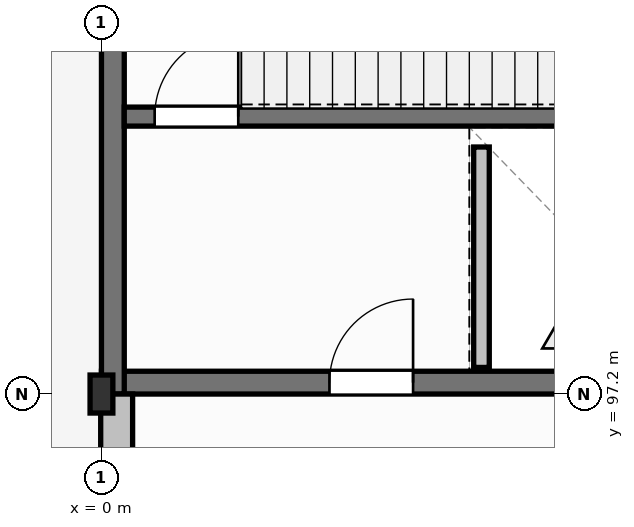
"""IFC4 building model, lengths in metres.
Left out: names, types, materials, properties, quantities, classifications, styles, units other than length and angle.
Written with IfcOpenShell. Run it as: python <this file> out.ifc"""

import sys

from ifc_helpers import new_model, si_unit, direction, frame, frame_2d, origin, origin_2d, place, context, subcontext, project, spatial, rectangle, i_section, extrude, element, fill, save


model = new_model("IFC4")
c1 = context("Model", 3, precision=1e-05, world=origin(), true_north=direction((0.0, 1.0)))
c2 = subcontext(c1, "Body", "Model", "MODEL_VIEW")
j1 = project(units=[si_unit("LENGTHUNIT", "METRE"), si_unit("PLANEANGLEUNIT", "RADIAN")], contexts=[c1])
p1 = place(None, origin())
s1 = spatial("IfcSite", under=j1, at=p1, CompositionType="ELEMENT")
p2 = place(p1, origin())
s2 = spatial("IfcBuilding", under=s1, at=p2, CompositionType="ELEMENT")
p3 = place(p2, origin())
s3 = spatial("IfcBuildingStorey", under=s2, at=p3, CompositionType="ELEMENT", Elevation=0.0)
p4 = place(p3, frame((0.0, 97.35, 0.0), z_axis=(0.0, 0.0, 1.0), x_axis=(1.0, 0.0, 0.0)))
e1 = element("IfcWall", 1, at=p4, inside=s3, PredefinedType="SHEAR", context=c2, shape_type="SweptSolid", body=[
    extrude(rectangle(XDim=8.4, YDim=0.3, at=frame_2d((4.2, 0.0))), origin(), (0.0, 0.0, 1.0), 4.5),
])
p5 = place(p4, frame((3.0, 0.0, 0.0)))
e2 = element("IfcOpeningElement", 2, at=p5, cuts=e1, PredefinedType="OPENING", context=c2, shape_type="SweptSolid", body=[
    extrude(rectangle(XDim=1.1, YDim=2.15, at=frame_2d((0.55, 1.075))), frame((0.0, 0.16, 0.0), z_axis=(0.0, -1.0, 0.0), x_axis=(1.0, 0.0, 0.0)), (0.0, 0.0, 1.0), 0.32),
])
p6 = place(p3, frame((0.15, 97.2, 0.0), z_axis=(0.0, 0.0, 1.0), x_axis=(0.0, 1.0, 0.0)))
e3 = element("IfcWall", 3, at=p6, inside=s3, PredefinedType="SHEAR", context=c2, shape_type="SweptSolid", body=[
    extrude(rectangle(XDim=7.2, YDim=0.3, at=frame_2d((3.6, 0.0))), origin(), (0.0, 0.0, 1.0), 4.5),
])
p7 = place(p6, frame((4.75, 0.0, 0.0)))
e4 = element("IfcOpeningElement", 4, at=p7, cuts=e3, PredefinedType="OPENING", context=c2, shape_type="SweptSolid", body=[
    extrude(rectangle(XDim=1.3, YDim=2.25, at=frame_2d((0.65, 1.125))), frame((0.0, 0.16, 0.0), z_axis=(0.0, -1.0, 0.0), x_axis=(1.0, 0.0, 0.0)), (0.0, 0.0, 1.0), 0.32),
])
p8 = place(p3, frame((0.3, 100.85, 0.0), z_axis=(0.0, 0.0, 1.0), x_axis=(1.0, 0.0, 0.0)))
e5 = element("IfcWall", 5, at=p8, inside=s3, PredefinedType="SHEAR", context=c2, shape_type="SweptSolid", body=[
    extrude(rectangle(XDim=7.8, YDim=0.25, at=frame_2d((3.9, 0.0))), origin(), (0.0, 0.0, 1.0), 4.5),
])
p9 = place(p8, frame((0.4, 0.0, 0.0)))
e6 = element("IfcOpeningElement", 6, at=p9, cuts=e5, PredefinedType="OPENING", context=c2, shape_type="SweptSolid", body=[
    extrude(rectangle(XDim=1.1, YDim=2.15, at=frame_2d((0.55, 1.075))), frame((0.0, 0.135, 0.0), z_axis=(0.0, -1.0, 0.0), x_axis=(1.0, 0.0, 0.0)), (0.0, 0.0, 1.0), 0.27),
])
p10 = place(p3, frame((0.0, 97.2, 0.0), z_axis=(0.0, 0.0, 1.0), x_axis=(1.0, 0.0, 0.0)))
e7 = element("IfcColumn", 7, at=p10, inside=s3, PredefinedType="COLUMN", context=c2, shape_type="SweptSolid", body=[
    extrude(i_section(OverallWidth=0.3, OverallDepth=0.5, WebThickness=0.014, FlangeThickness=0.028, FilletRadius=0.027, at=origin_2d()), origin(), (0.0, 0.0, 1.0), 4.5),
])
p11 = place(p3, frame((0.2, 90.0, 0.0), z_axis=(0.0, 0.0, 1.0), x_axis=(0.0, 1.0, 0.0)))
e8 = element("IfcWall", 8, at=p11, inside=s3, PredefinedType="SOLIDWALL", context=c2, shape_type="SweptSolid", body=[
    extrude(rectangle(XDim=7.2, YDim=0.42, at=frame_2d((3.6, 0.0))), origin(), (0.0, 0.0, 1.0), 3.898),
])
p12 = place(p11, frame((1.2, 0.0, 0.85)))
e9 = element("IfcOpeningElement", 9, at=p12, cuts=e8, PredefinedType="OPENING", context=c2, shape_type="SweptSolid", body=[
    extrude(rectangle(XDim=2.4, YDim=2.05, at=frame_2d((1.2, 1.025))), frame((0.0, 0.22, 0.0), z_axis=(0.0, -1.0, 0.0), x_axis=(1.0, 0.0, 0.0)), (0.0, 0.0, 1.0), 0.44),
])
p13 = place(p11, frame((4.175, 0.0, 0.85)))
e10 = element("IfcOpeningElement", 10, at=p13, cuts=e8, PredefinedType="OPENING", context=c2, shape_type="SweptSolid", body=[
    extrude(rectangle(XDim=1.25, YDim=1.5, at=frame_2d((0.625, 0.75))), frame((0.0, 0.22, 0.0), z_axis=(0.0, -1.0, 0.0), x_axis=(1.0, 0.0, 0.0)), (0.0, 0.0, 1.0), 0.44),
])
p14 = place(p3, frame((5.0, 97.55, 0.0), z_axis=(0.0, 0.0, 1.0), x_axis=(0.0, 1.0, 0.0)))
e11 = element("IfcWall", 11, at=p14, inside=s3, PredefinedType="PARTITIONING", context=c2, shape_type="SweptSolid", body=[
    extrude(rectangle(XDim=2.9, YDim=0.205, at=frame_2d((1.45, 0.0))), origin(), (0.0, 0.0, 1.0), 4.23),
])
p15 = place(p9, origin())
e12 = element("IfcDoor", 12, at=p15, inside=s3, OperationType="SINGLE_SWING_RIGHT", PredefinedType="DOOR", context=c2, shape_type="SweptSolid", body=[
    extrude(rectangle(XDim=1.1, YDim=2.15, at=frame_2d((0.55, 1.075))), frame((0.0, 0.025, 0.0), z_axis=(0.0, -1.0, 0.0), x_axis=(1.0, 0.0, 0.0)), (0.0, 0.0, 1.0), 0.05),
])
fill(e6, e12)
p16 = place(p5, origin())
e13 = element("IfcDoor", 13, at=p16, inside=s3, OperationType="SINGLE_SWING_RIGHT", PredefinedType="DOOR", context=c2, shape_type="SweptSolid", body=[
    extrude(rectangle(XDim=1.1, YDim=2.15, at=frame_2d((0.55, 1.075))), frame((0.0, 0.025, 0.0), z_axis=(0.0, -1.0, 0.0), x_axis=(1.0, 0.0, 0.0)), (0.0, 0.0, 1.0), 0.05),
])
fill(e2, e13)
save(model, sys.argv[1])
